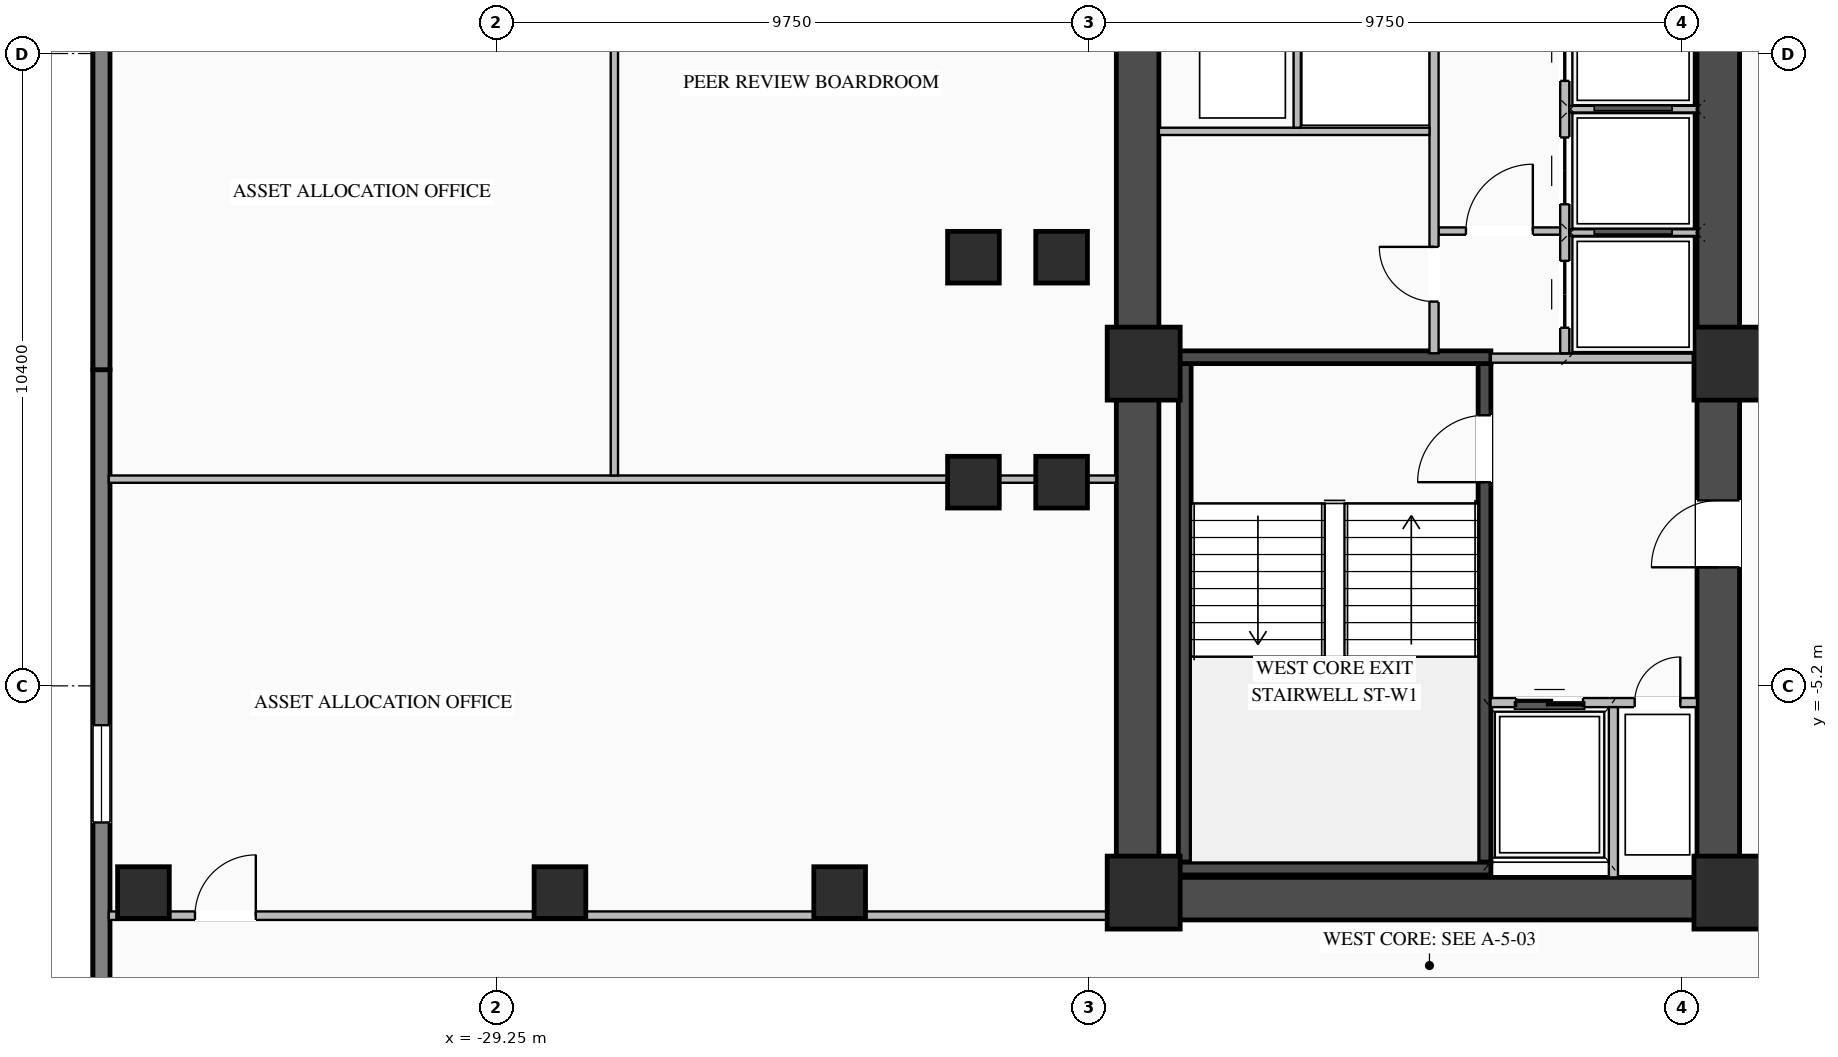
"""IFC4 building model, lengths in metres.
Left out: names, types, materials, properties, quantities, classifications, styles, units other than length and angle.
Written with IfcOpenShell. Run it as: python <this file> out.ifc"""

import sys

from ifc_helpers import new_model, si_unit, direction, frame, frame_2d, origin, origin_2d, place, context, subcontext, project, spatial, rectangle, i_section, extrude, element, fill, save


model = new_model("IFC4")
c1 = context("Model", 3, precision=1e-05, world=origin(), true_north=direction((0.0, 1.0)))
c2 = subcontext(c1, "Body", "Model", "MODEL_VIEW")
j1 = project(units=[si_unit("LENGTHUNIT", "METRE"), si_unit("PLANEANGLEUNIT", "RADIAN")], contexts=[c1])
p1 = place(None, origin())
s1 = spatial("IfcSite", under=j1, at=p1, CompositionType="ELEMENT")
p2 = place(p1, origin())
s2 = spatial("IfcBuilding", under=s1, at=p2, CompositionType="ELEMENT")
p3 = place(p2, frame((0.0, 0.0, 51.9)))
s3 = spatial("IfcBuildingStorey", under=s2, at=p3, CompositionType="ELEMENT", Elevation=51.9)
p4 = place(p3, frame((-19.05, -8.7, 0.0), z_axis=(0.0, 0.0, 1.0), x_axis=(1.0, 0.0, 0.0)))
e1 = element("IfcWall", 1, at=p4, inside=s3, PredefinedType="SHEAR", context=c2, shape_type="SweptSolid", body=[
    extrude(rectangle(XDim=10.25, YDim=0.7, at=frame_2d((5.125, 0.0))), origin(), (0.0, 0.0, 1.0), 3.27),
])
p5 = place(p3, frame((-18.7, -8.35, 0.0), z_axis=(0.0, 0.0, 1.0), x_axis=(0.0, 1.0, 0.0)))
e2 = element("IfcWall", 2, at=p5, inside=s3, PredefinedType="SHEAR", context=c2, shape_type="SweptSolid", body=[
    extrude(rectangle(XDim=16.7, YDim=0.7, at=frame_2d((8.35, 0.0))), origin(), (0.0, 0.0, 1.0), 3.27),
])
p6 = place(p3, frame((-9.15, -8.35, 0.0), z_axis=(0.0, 0.0, 1.0), x_axis=(0.0, 1.0, 0.0)))
e3 = element("IfcWall", 3, at=p6, inside=s3, PredefinedType="SHEAR", context=c2, shape_type="SweptSolid", body=[
    extrude(rectangle(XDim=16.7, YDim=0.7, at=frame_2d((8.35, 0.0))), origin(), (0.0, 0.0, 1.0), 3.27),
])
p7 = place(p6, frame((5.1, 0.0, 0.0)))
e4 = element("IfcOpeningElement", 4, at=p7, cuts=e3, PredefinedType="OPENING", context=c2, shape_type="SweptSolid", body=[
    extrude(rectangle(XDim=1.1, YDim=2.08, at=frame_2d((0.55, 1.04))), frame((0.0, 0.36, 0.0), z_axis=(0.0, -1.0, 0.0), x_axis=(1.0, 0.0, 0.0)), (0.0, 0.0, 1.0), 0.72),
])
p8 = place(p3, frame((-12.995, -8.1, 0.0), z_axis=(0.0, 0.0, 1.0), x_axis=(0.0, 1.0, 0.0)))
e5 = element("IfcWall", 5, at=p8, inside=s3, PredefinedType="SHEAR", context=c2, shape_type="SweptSolid", body=[
    extrude(rectangle(XDim=8.2, YDim=0.21, at=frame_2d((4.1, 0.0))), origin(), (0.0, 0.0, 1.0), 3.27),
])
p9 = place(p8, frame((6.25, 0.0, 0.0)))
e6 = element("IfcOpeningElement", 6, at=p9, cuts=e5, PredefinedType="OPENING", context=c2, shape_type="SweptSolid", body=[
    extrude(rectangle(XDim=1.1, YDim=2.15, at=frame_2d((0.55, 1.075))), frame((0.0, 0.115, 0.0), z_axis=(0.0, -1.0, 0.0), x_axis=(1.0, 0.0, 0.0)), (0.0, 0.0, 1.0), 0.23),
])
p10 = place(p3, frame((-17.925, -8.1, 0.0), z_axis=(0.0, 0.0, 1.0), x_axis=(0.0, 1.0, 0.0)))
e7 = element("IfcWall", 7, at=p10, inside=s3, PredefinedType="SHEAR", context=c2, shape_type="SweptSolid", body=[
    extrude(rectangle(XDim=8.2, YDim=0.21, at=frame_2d((4.1, 0.0))), origin(), (0.0, 0.0, 1.0), 3.27),
])
for number, where, z_axis, x_axis in (
    (8, (-18.03, -8.205, 0.0), (0.0, 0.0, 1.0), (1.0, 0.0, 0.0)),
    (9, (-12.89, 0.205, 0.0), (0.0, 0.0, 1.0), (-1.0, 0.0, 0.0)),
):
    element("IfcWall", number, at=place(p3, frame(where, z_axis=z_axis, x_axis=x_axis)), inside=s3, PredefinedType="SHEAR", context=c2, shape_type="SweptSolid", body=[
        extrude(rectangle(XDim=5.14, YDim=0.21, at=frame_2d((2.57, 0.0))), origin(), (0.0, 0.0, 1.0), 3.27),
    ])
for number, where, z_axis, x_axis in (
    (10, (-8.95, -8.6, 0.0), (0.0, 0.0, 1.0), (1.0, 0.0, 0.0)),
    (11, (-8.95, 0.1, 0.0), (0.0, 0.0, 1.0), (1.0, 0.0, 0.0)),
    (12, (-18.6, -8.6, 0.0), (0.0, 0.0, 1.0), (1.0, 0.0, 0.0)),
    (13, (-18.6, 0.1, 0.0), (0.0, 0.0, 1.0), (1.0, 0.0, 0.0)),
):
    element("IfcColumn", number, at=place(p3, frame(where, z_axis=z_axis, x_axis=x_axis)), inside=s3, PredefinedType="COLUMN", context=c2, shape_type="SweptSolid", body=[
        extrude(rectangle(XDim=1.2, YDim=1.2, at=origin_2d()), origin(), (0.0, 0.0, 1.0), 3.45),
    ])
for number, where, z_axis, x_axis in (
    (14, (-21.4, -1.85, 0.0), (0.0, 0.0, 1.0), (1.0, 0.0, 0.0)),
    (15, (-21.4, 1.85, 0.0), (0.0, 0.0, 1.0), (1.0, 0.0, 0.0)),
    (16, (-19.95, -1.85, 0.0), (0.0, 0.0, 1.0), (1.0, 0.0, 0.0)),
    (17, (-19.95, 1.85, 0.0), (0.0, 0.0, 1.0), (1.0, 0.0, 0.0)),
    (18, (-23.6, -8.6, 0.0), (0.0, 0.0, 1.0), (1.0, 0.0, 0.0)),
    (19, (-28.2, -8.6, 0.0), (0.0, 0.0, 1.0), (1.0, 0.0, 0.0)),
    (20, (-35.05, -8.6, 0.0), (0.0, 0.0, 1.0), (1.0, 0.0, 0.0)),
):
    element("IfcColumn", number, at=place(p3, frame(where, z_axis=z_axis, x_axis=x_axis)), inside=s3, PredefinedType="COLUMN", context=c2, shape_type="SweptSolid", body=[
        extrude(i_section(OverallWidth=0.85, OverallDepth=0.85, WebThickness=0.032, FlangeThickness=0.048, at=origin_2d()), origin(), (0.0, 0.0, 1.0), 3.45),
    ])
p11 = place(p3, frame((-35.74, -19.94, 0.0), z_axis=(0.0, 0.0, 1.0), x_axis=(0.0, 1.0, 0.0)))
e21 = element("IfcWall", 21, at=p11, inside=s3, PredefinedType="STANDARD", context=c2, shape_type="SweptSolid", body=[
    extrude(rectangle(XDim=19.94, YDim=0.28, at=frame_2d((9.97, 0.0))), origin(), (0.0, 0.0, 1.0), 3.25),
])
p12 = place(p11, frame((6.397, 0.0, 0.76)))
e22 = element("IfcOpeningElement", 22, at=p12, cuts=e21, PredefinedType="OPENING", context=c2, shape_type="SweptSolid", body=[
    extrude(rectangle(XDim=1.6, YDim=1.95, at=frame_2d((0.8, 0.975))), frame((0.0, 0.15, 0.0), z_axis=(0.0, -1.0, 0.0), x_axis=(1.0, 0.0, 0.0)), (0.0, 0.0, 1.0), 0.3),
])
p13 = place(p11, frame((12.493, 0.0, 0.76)))
e23 = element("IfcOpeningElement", 23, at=p13, cuts=e21, PredefinedType="OPENING", context=c2, shape_type="SweptSolid", body=[
    extrude(rectangle(XDim=1.6, YDim=1.95, at=frame_2d((0.8, 0.975))), frame((0.0, 0.15, 0.0), z_axis=(0.0, -1.0, 0.0), x_axis=(1.0, 0.0, 0.0)), (0.0, 0.0, 1.0), 0.3),
])
p14 = place(p3, frame((-35.74, 0.0, 0.0), z_axis=(0.0, 0.0, 1.0), x_axis=(0.0, 1.0, 0.0)))
e24 = element("IfcWall", 24, at=p14, inside=s3, PredefinedType="STANDARD", context=c2, shape_type="SweptSolid", body=[
    extrude(rectangle(XDim=19.94, YDim=0.28, at=frame_2d((9.97, 0.0))), origin(), (0.0, 0.0, 1.0), 3.25),
])
p15 = place(p14, frame((5.847, 0.0, 0.76)))
e25 = element("IfcOpeningElement", 25, at=p15, cuts=e24, PredefinedType="OPENING", context=c2, shape_type="SweptSolid", body=[
    extrude(rectangle(XDim=1.6, YDim=1.95, at=frame_2d((0.8, 0.975))), frame((0.0, 0.15, 0.0), z_axis=(0.0, -1.0, 0.0), x_axis=(1.0, 0.0, 0.0)), (0.0, 0.0, 1.0), 0.3),
])
p16 = place(p14, frame((11.943, 0.0, 0.76)))
e26 = element("IfcOpeningElement", 26, at=p16, cuts=e24, PredefinedType="OPENING", context=c2, shape_type="SweptSolid", body=[
    extrude(rectangle(XDim=1.6, YDim=1.95, at=frame_2d((0.8, 0.975))), frame((0.0, 0.15, 0.0), z_axis=(0.0, -1.0, 0.0), x_axis=(1.0, 0.0, 0.0)), (0.0, 0.0, 1.0), 0.3),
])
p17 = place(p3, frame((-12.895, -5.475, 0.0), z_axis=(0.0, 0.0, 1.0), x_axis=(1.0, 0.0, 0.0)))
e27 = element("IfcWall", 27, at=p17, inside=s3, PredefinedType="STANDARD", context=c2, shape_type="SweptSolid", body=[
    extrude(rectangle(XDim=3.395, YDim=0.15, at=frame_2d((1.698, 0.0))), origin(), (0.0, 0.0, 1.0), 3.25),
])
p18 = place(p17, frame((0.42, 0.0, 0.0)))
e28 = element("IfcOpeningElement", 28, at=p18, cuts=e27, PredefinedType="OPENING", context=c2, shape_type="SweptSolid", body=[
    extrude(rectangle(XDim=1.1, YDim=2.15, at=frame_2d((0.55, 1.075))), frame((0.0, 0.085, 0.0), z_axis=(0.0, -1.0, 0.0), x_axis=(1.0, 0.0, 0.0)), (0.0, 0.0, 1.0), 0.17),
])
p19 = place(p17, frame((2.37, 0.0, 0.0)))
e29 = element("IfcOpeningElement", 29, at=p19, cuts=e27, PredefinedType="OPENING", context=c2, shape_type="SweptSolid", body=[
    extrude(rectangle(XDim=0.75, YDim=2.05, at=frame_2d((0.375, 1.025))), frame((0.0, 0.085, 0.0), z_axis=(0.0, -1.0, 0.0), x_axis=(1.0, 0.0, 0.0)), (0.0, 0.0, 1.0), 0.17),
])
p20 = place(p3, frame((-10.875, -8.35, 0.0), z_axis=(0.0, 0.0, 1.0), x_axis=(0.0, 1.0, 0.0)))
e30 = element("IfcWall", 30, at=p20, inside=s3, PredefinedType="STANDARD", context=c2, shape_type="SweptSolid", body=[
    extrude(rectangle(XDim=2.8, YDim=0.15, at=frame_2d((1.4, 0.0))), origin(), (0.0, 0.0, 1.0), 3.25),
])
p21 = place(p3, frame((-12.89, 0.19, 0.0), z_axis=(0.0, 0.0, 1.0), x_axis=(1.0, 0.0, 0.0)))
e31 = element("IfcWall", 31, at=p21, inside=s3, PredefinedType="STANDARD", context=c2, shape_type="SweptSolid", body=[
    extrude(rectangle(XDim=3.39, YDim=0.15, at=frame_2d((1.695, 0.0))), origin(), (0.0, 0.0, 1.0), 2.645),
])
p22 = place(p3, frame((-13.75, 2.28, 0.0), z_axis=(0.0, 0.0, 1.0), x_axis=(1.0, 0.0, 0.0)))
e32 = element("IfcWall", 32, at=p22, inside=s3, PredefinedType="STANDARD", context=c2, shape_type="SweptSolid", body=[
    extrude(rectangle(XDim=2.0, YDim=0.12, at=frame_2d((1.0, 0.0))), origin(), (0.0, 0.0, 1.0), 3.25),
])
p23 = place(p22, frame((0.45, 0.0, 0.0)))
e33 = element("IfcOpeningElement", 33, at=p23, cuts=e32, PredefinedType="OPENING", context=c2, shape_type="SweptSolid", body=[
    extrude(rectangle(XDim=1.1, YDim=2.1, at=frame_2d((0.55, 1.05))), frame((0.0, 0.07, 0.0), z_axis=(0.0, -1.0, 0.0), x_axis=(1.0, 0.0, 0.0)), (0.0, 0.0, 1.0), 0.14),
])
p24 = place(p3, frame((-11.675, 0.27, 0.0), z_axis=(0.0, 0.0, 1.0), x_axis=(0.0, 1.0, 0.0)))
e34 = element("IfcWall", 34, at=p24, inside=s3, PredefinedType="STANDARD", context=c2, shape_type="SweptSolid", body=[
    extrude(rectangle(XDim=8.08, YDim=0.15, at=frame_2d((4.04, 0.0))), origin(), (0.0, 0.0, 1.0), 3.25),
])
p25 = place(p24, frame((0.42, 0.0, 0.0)))
e35 = element("IfcOpeningElement", 35, at=p25, cuts=e34, PredefinedType="OPENING", context=c2, shape_type="SweptSolid", body=[
    extrude(rectangle(XDim=1.1, YDim=2.1, at=frame_2d((0.55, 1.05))), frame((0.0, 0.085, 0.0), z_axis=(0.0, -1.0, 0.0), x_axis=(1.0, 0.0, 0.0)), (0.0, 0.0, 1.0), 0.17),
])
p26 = place(p24, frame((2.45, 0.0, 0.0)))
e36 = element("IfcOpeningElement", 36, at=p26, cuts=e34, PredefinedType="OPENING", context=c2, shape_type="SweptSolid", body=[
    extrude(rectangle(XDim=1.1, YDim=2.1, at=frame_2d((0.55, 1.05))), frame((0.0, 0.085, 0.0), z_axis=(0.0, -1.0, 0.0), x_axis=(1.0, 0.0, 0.0)), (0.0, 0.0, 1.0), 0.17),
])
p27 = place(p24, frame((4.48, 0.0, 0.0)))
e37 = element("IfcOpeningElement", 37, at=p27, cuts=e34, PredefinedType="OPENING", context=c2, shape_type="SweptSolid", body=[
    extrude(rectangle(XDim=1.1, YDim=2.1, at=frame_2d((0.55, 1.05))), frame((0.0, 0.085, 0.0), z_axis=(0.0, -1.0, 0.0), x_axis=(1.0, 0.0, 0.0)), (0.0, 0.0, 1.0), 0.17),
])
p28 = place(p24, frame((6.51, 0.0, 0.0)))
e38 = element("IfcOpeningElement", 38, at=p28, cuts=e34, PredefinedType="OPENING", context=c2, shape_type="SweptSolid", body=[
    extrude(rectangle(XDim=1.1, YDim=2.1, at=frame_2d((0.55, 1.05))), frame((0.0, 0.085, 0.0), z_axis=(0.0, -1.0, 0.0), x_axis=(1.0, 0.0, 0.0)), (0.0, 0.0, 1.0), 0.17),
])
for number, where, z_axis, x_axis in (
    (39, (-11.6, 2.255, 0.0), (0.0, 0.0, 1.0), (1.0, 0.0, 0.0)),
    (40, (-11.6, 4.285, 0.0), (0.0, 0.0, 1.0), (1.0, 0.0, 0.0)),
):
    element("IfcWall", number, at=place(p3, frame(where, z_axis=z_axis, x_axis=x_axis)), inside=s3, PredefinedType="STANDARD", context=c2, shape_type="SweptSolid", body=[
        extrude(rectangle(XDim=2.1, YDim=0.11, at=frame_2d((1.05, 0.0))), origin(), (0.0, 0.0, 1.0), 3.25),
    ])
p29 = place(p3, frame((-13.825, 0.27, 0.0), z_axis=(0.0, 0.0, 1.0), x_axis=(0.0, 1.0, 0.0)))
e41 = element("IfcWall", 41, at=p29, inside=s3, PredefinedType="STANDARD", context=c2, shape_type="SweptSolid", body=[
    extrude(rectangle(XDim=8.08, YDim=0.15, at=frame_2d((4.04, 0.0))), origin(), (0.0, 0.0, 1.0), 3.25),
])
p30 = place(p29, frame((0.85, 0.0, 0.0)))
e42 = element("IfcOpeningElement", 42, at=p30, cuts=e41, PredefinedType="OPENING", context=c2, shape_type="SweptSolid", body=[
    extrude(rectangle(XDim=0.9, YDim=2.05, at=frame_2d((0.45, 1.025))), frame((0.0, 0.085, 0.0), z_axis=(0.0, -1.0, 0.0), x_axis=(1.0, 0.0, 0.0)), (0.0, 0.0, 1.0), 0.17),
])
p31 = place(p3, frame((-18.35, 3.92, 0.0), z_axis=(0.0, 0.0, 1.0), x_axis=(1.0, 0.0, 0.0)))
e43 = element("IfcWall", 43, at=p31, inside=s3, PredefinedType="STANDARD", context=c2, shape_type="SweptSolid", body=[
    extrude(rectangle(XDim=4.45, YDim=0.12, at=frame_2d((2.225, 0.0))), origin(), (0.0, 0.0, 1.0), 3.25),
])
p32 = place(p3, frame((-16.075, 3.98, 0.0), z_axis=(0.0, 0.0, 1.0), x_axis=(0.0, 1.0, 0.0)))
e44 = element("IfcWall", 44, at=p32, inside=s3, PredefinedType="STANDARD", context=c2, shape_type="SweptSolid", body=[
    extrude(rectangle(XDim=4.37, YDim=0.12, at=frame_2d((2.185, 0.0))), origin(), (0.0, 0.0, 1.0), 3.25),
])
p33 = place(p3, frame((-35.62, -8.98, 0.0), z_axis=(0.0, 0.0, 1.0), x_axis=(1.0, 0.0, 0.0)))
e45 = element("IfcWall", 45, at=p33, inside=s3, PredefinedType="STANDARD", context=c2, shape_type="SweptSolid", body=[
    extrude(rectangle(XDim=16.57, YDim=0.14, at=frame_2d((8.285, 0.0))), origin(), (0.0, 0.0, 1.0), 3.25),
])
p34 = place(p33, frame((1.418, 0.0, 0.0)))
e46 = element("IfcOpeningElement", 46, at=p34, cuts=e45, PredefinedType="OPENING", context=c2, shape_type="SweptSolid", body=[
    extrude(rectangle(XDim=1.0, YDim=2.08, at=frame_2d((0.5, 1.04))), frame((0.0, 0.08, 0.0), z_axis=(0.0, -1.0, 0.0), x_axis=(1.0, 0.0, 0.0)), (0.0, 0.0, 1.0), 0.16),
])
p35 = place(p3, frame((-35.62, -1.8, 0.0), z_axis=(0.0, 0.0, 1.0), x_axis=(1.0, 0.0, 0.0)))
e47 = element("IfcWall", 47, at=p35, inside=s3, PredefinedType="STANDARD", context=c2, shape_type="SweptSolid", body=[
    extrude(rectangle(XDim=16.57, YDim=0.12, at=frame_2d((8.285, 0.0))), origin(), (0.0, 0.0, 1.0), 3.25),
])
p36 = place(p3, frame((-27.305, -1.74, 0.0), z_axis=(0.0, 0.0, 1.0), x_axis=(0.0, 1.0, 0.0)))
e48 = element("IfcWall", 48, at=p36, inside=s3, PredefinedType="STANDARD", context=c2, shape_type="SweptSolid", body=[
    extrude(rectangle(XDim=10.72, YDim=0.12, at=frame_2d((5.36, 0.0))), origin(), (0.0, 0.0, 1.0), 3.25),
])
p37 = place(p13, origin())
e49 = element("IfcWindow", 49, at=p37, inside=s3, PartitioningType="SINGLE_PANEL", PredefinedType="WINDOW", context=c2, shape_type="SweptSolid", body=[
    extrude(rectangle(XDim=1.6, YDim=1.95, at=frame_2d((0.8, 0.975))), frame((0.0, 0.03, 0.0), z_axis=(0.0, -1.0, 0.0), x_axis=(1.0, 0.0, 0.0)), (0.0, 0.0, 1.0), 0.06),
])
fill(e23, e49)
p38 = place(p9, origin())
e50 = element("IfcDoor", 50, at=p38, inside=s3, OperationType="SINGLE_SWING_LEFT", PredefinedType="DOOR", context=c2, shape_type="SweptSolid", body=[
    extrude(rectangle(XDim=1.1, YDim=2.15, at=frame_2d((0.55, 1.075))), frame((0.0, 0.025, 0.0), z_axis=(0.0, -1.0, 0.0), x_axis=(1.0, 0.0, 0.0)), (0.0, 0.0, 1.0), 0.05),
])
fill(e6, e50)
p39 = place(p18, origin())
e51 = element("IfcDoor", 51, at=p39, inside=s3, OperationType="DOUBLE_DOOR_SLIDING", PredefinedType="DOOR", context=c2, shape_type="SweptSolid", body=[
    extrude(rectangle(XDim=1.1, YDim=2.15, at=frame_2d((0.55, 1.075))), frame((0.0, 0.025, 0.0), z_axis=(0.0, -1.0, 0.0), x_axis=(1.0, 0.0, 0.0)), (0.0, 0.0, 1.0), 0.05),
])
fill(e28, e51)
p40 = place(p19, origin())
e52 = element("IfcDoor", 52, at=p40, inside=s3, OperationType="SINGLE_SWING_RIGHT", PredefinedType="DOOR", context=c2, shape_type="SweptSolid", body=[
    extrude(rectangle(XDim=0.75, YDim=2.05, at=frame_2d((0.375, 1.025))), frame((0.0, 0.025, 0.0), z_axis=(0.0, -1.0, 0.0), x_axis=(1.0, 0.0, 0.0)), (0.0, 0.0, 1.0), 0.05),
])
fill(e29, e52)
p41 = place(p7, origin())
e53 = element("IfcDoor", 53, at=p41, inside=s3, OperationType="SINGLE_SWING_LEFT", PredefinedType="DOOR", context=c2, shape_type="SweptSolid", body=[
    extrude(rectangle(XDim=1.1, YDim=2.08, at=frame_2d((0.55, 1.04))), frame((0.0, 0.305, 0.0), z_axis=(0.0, -1.0, 0.0), x_axis=(1.0, 0.0, 0.0)), (0.0, 0.0, 1.0), 0.05),
])
fill(e4, e53)
p42 = place(p23, origin())
e54 = element("IfcDoor", 54, at=p42, inside=s3, OperationType="SINGLE_SWING_RIGHT", PredefinedType="DOOR", context=c2, shape_type="SweptSolid", body=[
    extrude(rectangle(XDim=1.1, YDim=2.1, at=frame_2d((0.55, 1.05))), frame((0.0, 0.025, 0.0), z_axis=(0.0, -1.0, 0.0), x_axis=(1.0, 0.0, 0.0)), (0.0, 0.0, 1.0), 0.05),
])
fill(e33, e54)
p43 = place(p25, origin())
e55 = element("IfcDoor", 55, at=p43, inside=s3, OperationType="DOUBLE_DOOR_SLIDING", PredefinedType="DOOR", context=c2, shape_type="SweptSolid", body=[
    extrude(rectangle(XDim=1.1, YDim=2.1, at=frame_2d((0.55, 1.05))), frame((0.0, 0.025, 0.0), z_axis=(0.0, -1.0, 0.0), x_axis=(1.0, 0.0, 0.0)), (0.0, 0.0, 1.0), 0.05),
])
fill(e35, e55)
p44 = place(p26, origin())
e56 = element("IfcDoor", 56, at=p44, inside=s3, OperationType="DOUBLE_DOOR_SLIDING", PredefinedType="DOOR", context=c2, shape_type="SweptSolid", body=[
    extrude(rectangle(XDim=1.1, YDim=2.1, at=frame_2d((0.55, 1.05))), frame((0.0, 0.025, 0.0), z_axis=(0.0, -1.0, 0.0), x_axis=(1.0, 0.0, 0.0)), (0.0, 0.0, 1.0), 0.05),
])
fill(e36, e56)
p45 = place(p27, origin())
e57 = element("IfcDoor", 57, at=p45, inside=s3, OperationType="DOUBLE_DOOR_SLIDING", PredefinedType="DOOR", context=c2, shape_type="SweptSolid", body=[
    extrude(rectangle(XDim=1.1, YDim=2.1, at=frame_2d((0.55, 1.05))), frame((0.0, 0.025, 0.0), z_axis=(0.0, -1.0, 0.0), x_axis=(1.0, 0.0, 0.0)), (0.0, 0.0, 1.0), 0.05),
])
fill(e37, e57)
p46 = place(p30, origin())
e58 = element("IfcDoor", 58, at=p46, inside=s3, OperationType="SINGLE_SWING_RIGHT", PredefinedType="DOOR", context=c2, shape_type="SweptSolid", body=[
    extrude(rectangle(XDim=0.9, YDim=2.05, at=frame_2d((0.45, 1.025))), frame((0.0, 0.025, 0.0), z_axis=(0.0, -1.0, 0.0), x_axis=(1.0, 0.0, 0.0)), (0.0, 0.0, 1.0), 0.05),
])
fill(e42, e58)
p47 = place(p34, origin())
e59 = element("IfcDoor", 59, at=p47, inside=s3, OperationType="SINGLE_SWING_RIGHT", PredefinedType="DOOR", context=c2, shape_type="SweptSolid", body=[
    extrude(rectangle(XDim=1.0, YDim=2.08, at=frame_2d((0.5, 1.04))), frame((0.0, 0.025, 0.0), z_axis=(0.0, -1.0, 0.0), x_axis=(1.0, 0.0, 0.0)), (0.0, 0.0, 1.0), 0.05),
])
fill(e46, e59)
save(model, sys.argv[1])
